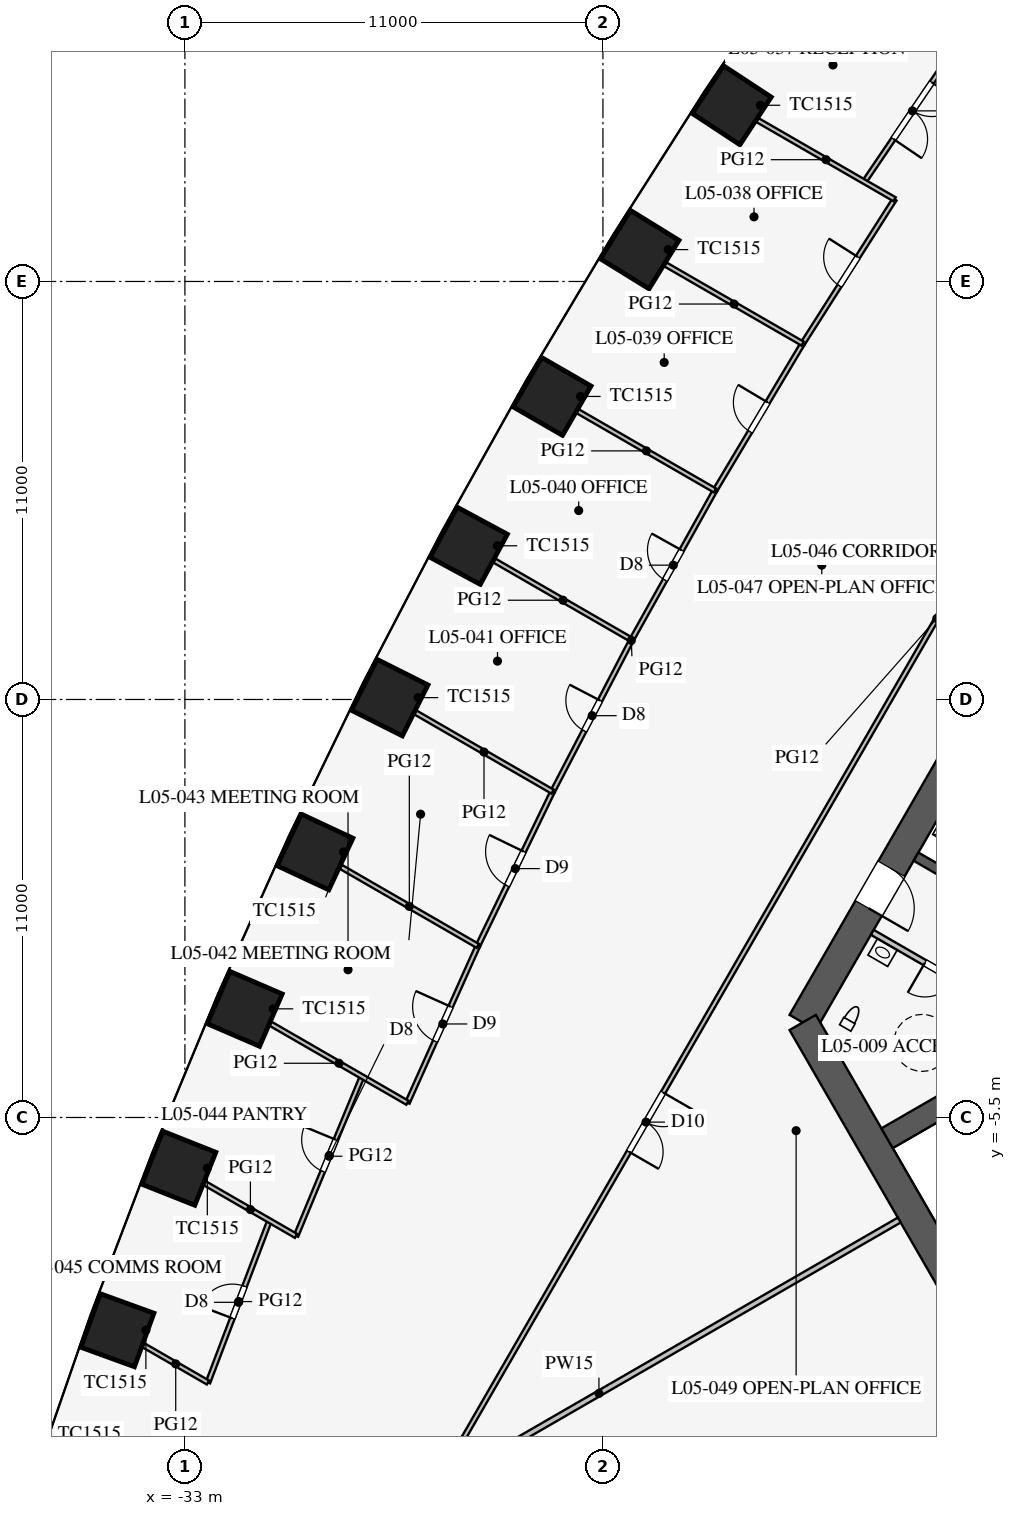
"""IFC4 building model, lengths in metres.
Left out: names, types, materials, properties, quantities, classifications, styles, units other than length and angle.
Written with IfcOpenShell. Run it as: python <this file> out.ifc"""

import sys

from ifc_helpers import new_model, si_unit, direction, frame, frame_2d, origin, origin_2d, place, context, subcontext, project, spatial, rectangle, extrude, element, fill, save


model = new_model("IFC4")
c1 = context("Model", 3, precision=1e-05, world=origin(), true_north=direction((0.0, 1.0)))
c2 = subcontext(c1, "Body", "Model", "MODEL_VIEW")
j1 = project(units=[si_unit("LENGTHUNIT", "METRE"), si_unit("PLANEANGLEUNIT", "RADIAN")], contexts=[c1])
p1 = place(None, origin())
s1 = spatial("IfcSite", under=j1, at=p1, CompositionType="ELEMENT")
p2 = place(p1, origin())
s2 = spatial("IfcBuilding", under=s1, at=p2, CompositionType="ELEMENT")
p3 = place(p2, frame((0.0, 0.0, 24.9)))
s3 = spatial("IfcBuildingStorey", under=s2, at=p3, CompositionType="ELEMENT", Elevation=24.9)
for number, where, z_axis, x_axis in (
    (1, (-18.611, 21.137, 0.0), (0.0, 0.0, 1.0), (-0.549, -0.836, 0.0)),
    (2, (-21.031, 17.339, 0.0), (0.0, 0.0, 1.0), (-0.525, -0.851, 0.0)),
    (3, (-23.338, 13.474, 0.0), (0.0, 0.0, 1.0), (-0.5, -0.866, 0.0)),
    (4, (-25.531, 9.544, 0.0), (0.0, 0.0, 1.0), (-0.475, -0.88, 0.0)),
    (5, (-27.611, 5.549, 0.0), (0.0, 0.0, 1.0), (-0.449, -0.894, 0.0)),
    (6, (-29.576, 1.487, 0.0), (0.0, 0.0, 1.0), (-0.423, -0.906, 0.0)),
    (7, (-31.426, -2.641, 0.0), (0.0, 0.0, 1.0), (-0.396, -0.918, 0.0)),
    (8, (-33.16, -6.836, 0.0), (0.0, 0.0, 1.0), (-0.369, -0.929, 0.0)),
    (9, (-34.776, -11.099, 0.0), (0.0, 0.0, 1.0), (-0.342, -0.94, 0.0)),
):
    element("IfcColumn", number, at=place(p3, frame(where, z_axis=z_axis, x_axis=x_axis)), inside=s3, PredefinedType="COLUMN", context=c2, shape_type="SweptSolid", body=[
        extrude(rectangle(XDim=1.5, YDim=1.5, at=origin_2d()), origin(), (0.0, 0.0, 1.0), 4.2),
    ])
p4 = place(p3, frame((-5.773, 16.0, 0.0), z_axis=(0.0, 0.0, 1.0), x_axis=(-0.500002442456, -0.866023993627, 0.0)))
e10 = element("IfcWall", 10, at=p4, inside=s3, PredefinedType="SHEAR", context=c2, shape_type="SweptSolid", body=[
    extrude(rectangle(XDim=21.939, YDim=0.8, at=frame_2d((10.97, 0.0))), origin(), (0.0, 0.0, 1.0), 4.2),
])
p5 = place(p4, frame((17.27, 0.0, 0.0)))
e11 = element("IfcOpeningElement", 11, at=p5, cuts=e10, PredefinedType="OPENING", context=c2, shape_type="SweptSolid", body=[
    extrude(rectangle(XDim=1.2, YDim=2.1, at=frame_2d((0.6, 1.05))), frame((0.0, 0.41, 0.0), z_axis=(0.0, -1.0, 0.0), x_axis=(1.0, 0.0, 0.0)), (0.0, 0.0, 1.0), 0.82),
])
p6 = place(p4, frame((3.47, 0.0, 0.0)))
e12 = element("IfcOpeningElement", 12, at=p6, cuts=e10, PredefinedType="OPENING", context=c2, shape_type="SweptSolid", body=[
    extrude(rectangle(XDim=1.2, YDim=2.1, at=frame_2d((0.6, 1.05))), frame((0.0, 0.41, 0.0), z_axis=(0.0, -1.0, 0.0), x_axis=(1.0, 0.0, 0.0)), (0.0, 0.0, 1.0), 0.82),
])
p7 = place(p3, frame((-16.743, -3.0, 0.0), z_axis=(0.0, 0.0, 1.0), x_axis=(0.499995765644, -0.866027848477, 0.0)))
e13 = element("IfcWall", 13, at=p7, inside=s3, PredefinedType="SHEAR", context=c2, shape_type="SweptSolid", body=[
    extrude(rectangle(XDim=11.547, YDim=0.8, at=frame_2d((5.773, 0.0))), origin(), (0.0, 0.0, 1.0), 4.2),
])
p8 = place(p3, frame((-11.532, 0.076, 0.0), z_axis=(0.0, 0.0, 1.0), x_axis=(-0.866005588531, 0.500034319456, 0.0)))
e14 = element("IfcWall", 14, at=p8, inside=s3, PredefinedType="SHEAR", context=c2, shape_type="SweptSolid", body=[
    extrude(rectangle(XDim=2.575, YDim=0.25, at=frame_2d((1.288, 0.0))), origin(), (0.0, 0.0, 1.0), 4.2),
])
p9 = place(p3, frame((-6.663, -1.509, 0.0), z_axis=(0.0, 0.0, 1.0), x_axis=(-0.866019375473, -0.500010441196, 0.0)))
e15 = element("IfcWall", 15, at=p9, inside=s3, PredefinedType="SHEAR", context=c2, shape_type="SweptSolid", body=[
    extrude(rectangle(XDim=9.075, YDim=0.6, at=frame_2d((4.538, 0.0))), origin(), (0.0, 0.0, 1.0), 4.2),
])
p10 = place(p3, frame((-10.495, -3.178, 0.0), z_axis=(0.0, 0.0, 1.0), x_axis=(-0.86602216432, 0.500005610874, 0.0)))
e16 = element("IfcWall", 16, at=p10, inside=s3, PredefinedType="PARTITIONING", context=c2, shape_type="SweptSolid", body=[
    extrude(rectangle(XDim=5.1, YDim=0.15, at=frame_2d((2.55, 0.0))), origin(), (0.0, 0.0, 1.0), 4.0),
])
p11 = place(p10, frame((2.6, 0.0, 0.0)))
e17 = element("IfcOpeningElement", 17, at=p11, cuts=e16, PredefinedType="OPENING", context=c2, shape_type="SweptSolid", body=[
    extrude(rectangle(XDim=0.9, YDim=2.1, at=frame_2d((0.45, 1.05))), frame((0.0, 0.085, 0.0), z_axis=(0.0, -1.0, 0.0), x_axis=(1.0, 0.0, 0.0)), (0.0, 0.0, 1.0), 0.17),
])
p12 = place(p3, frame((-14.203, -8.2, 0.0), z_axis=(0.0, 0.0, 1.0), x_axis=(-0.866024965723, -0.500000758745, 0.0)))
e18 = element("IfcWall", 18, at=p12, inside=s3, PredefinedType="PARTITIONING", context=c2, shape_type="SweptSolid", body=[
    extrude(rectangle(XDim=18.25, YDim=0.15, at=frame_2d((9.125, 0.0))), origin(), (0.0, 0.0, 1.0), 2.3),
])
p13 = place(p3, frame((-0.016, 30.491, 0.0), z_axis=(0.0, 0.0, 1.0), x_axis=(-0.50000091641, -0.866024874695, 0.0)))
e19 = element("IfcWall", 19, at=p13, inside=s3, PredefinedType="PARTITIONING", context=c2, shape_type="SweptSolid", body=[
    extrude(rectangle(XDim=52.796, YDim=0.12, at=frame_2d((26.398, 0.0))), origin(), (0.0, 0.0, 1.0), 2.9),
])
p14 = place(p13, frame((10.2, 0.0, 0.15)))
e20 = element("IfcOpeningElement", 20, at=p14, cuts=e19, PredefinedType="OPENING", context=c2, shape_type="SweptSolid", body=[
    extrude(rectangle(XDim=1.8, YDim=2.1, at=frame_2d((0.9, 1.05))), frame((0.0, 0.07, 0.0), z_axis=(0.0, -1.0, 0.0), x_axis=(1.0, 0.0, 0.0)), (0.0, 0.0, 1.0), 0.14),
])
p15 = place(p13, frame((40.8, 0.0, 0.15)))
e21 = element("IfcOpeningElement", 21, at=p15, cuts=e19, PredefinedType="OPENING", context=c2, shape_type="SweptSolid", body=[
    extrude(rectangle(XDim=1.8, YDim=2.1, at=frame_2d((0.9, 1.05))), frame((0.0, 0.07, 0.0), z_axis=(0.0, -1.0, 0.0), x_axis=(1.0, 0.0, 0.0)), (0.0, 0.0, 1.0), 0.14),
])
p16 = place(p3, frame((-19.052, 10.999, 0.0), z_axis=(0.0, 0.0, 1.0), x_axis=(-0.487373854787, -0.873193406795, 0.0)))
e22 = element("IfcWall", 22, at=p16, inside=s3, PredefinedType="PARTITIONING", context=c2, shape_type="SweptSolid", body=[
    extrude(rectangle(XDim=4.5, YDim=0.12, at=frame_2d((2.25, 0.0))), origin(), (0.0, 0.0, 1.0), 2.9),
])
p17 = place(p16, frame((1.8, 0.0, 0.15)))
e23 = element("IfcOpeningElement", 23, at=p17, cuts=e22, PredefinedType="OPENING", context=c2, shape_type="SweptSolid", body=[
    extrude(rectangle(XDim=0.9, YDim=2.1, at=frame_2d((0.45, 1.05))), frame((0.0, 0.07, 0.0), z_axis=(0.0, -1.0, 0.0), x_axis=(1.0, 0.0, 0.0)), (0.0, 0.0, 1.0), 0.14),
])
p18 = place(p3, frame((-25.292, -0.986, 0.0), z_axis=(0.0, 0.0, 1.0), x_axis=(-0.409451055745, -0.912332084796, 0.0)))
e24 = element("IfcWall", 24, at=p18, inside=s3, PredefinedType="PARTITIONING", context=c2, shape_type="SweptSolid", body=[
    extrude(rectangle(XDim=4.523, YDim=0.12, at=frame_2d((2.262, 0.0))), origin(), (0.0, 0.0, 1.0), 2.9),
])
p19 = place(p18, frame((1.75, 0.0, 0.15)))
e25 = element("IfcOpeningElement", 25, at=p19, cuts=e24, PredefinedType="OPENING", context=c2, shape_type="SweptSolid", body=[
    extrude(rectangle(XDim=1.0, YDim=2.1, at=frame_2d((0.5, 1.05))), frame((0.0, 0.07, 0.0), z_axis=(0.0, -1.0, 0.0), x_axis=(1.0, 0.0, 0.0)), (0.0, 0.0, 1.0), 0.14),
])
p20 = place(p3, frame((-28.339, -4.423, 0.0), z_axis=(0.0, 0.0, 1.0), x_axis=(-0.382639984525, -0.923897527999, 0.0)))
e26 = element("IfcWall", 26, at=p20, inside=s3, PredefinedType="PARTITIONING", context=c2, shape_type="SweptSolid", body=[
    extrude(rectangle(XDim=4.539, YDim=0.12, at=frame_2d((2.27, 0.0))), origin(), (0.0, 0.0, 1.0), 2.9),
])
p21 = place(p20, frame((1.8, 0.0, 0.15)))
e27 = element("IfcOpeningElement", 27, at=p21, cuts=e26, PredefinedType="OPENING", context=c2, shape_type="SweptSolid", body=[
    extrude(rectangle(XDim=0.9, YDim=2.1, at=frame_2d((0.45, 1.05))), frame((0.0, 0.07, 0.0), z_axis=(0.0, -1.0, 0.0), x_axis=(1.0, 0.0, 0.0)), (0.0, 0.0, 1.0), 0.14),
])
p22 = place(p3, frame((-30.773, -8.214, 0.0), z_axis=(0.0, 0.0, 1.0), x_axis=(-0.355351603025, -0.93473270951, 0.0)))
e28 = element("IfcWall", 28, at=p22, inside=s3, PredefinedType="PARTITIONING", context=c2, shape_type="SweptSolid", body=[
    extrude(rectangle(XDim=4.559, YDim=0.12, at=frame_2d((2.279, 0.0))), origin(), (0.0, 0.0, 1.0), 2.9),
])
p23 = place(p22, frame((1.85, 0.0, 0.15)))
e29 = element("IfcOpeningElement", 29, at=p23, cuts=e28, PredefinedType="OPENING", context=c2, shape_type="SweptSolid", body=[
    extrude(rectangle(XDim=0.9, YDim=2.1, at=frame_2d((0.45, 1.05))), frame((0.0, 0.07, 0.0), z_axis=(0.0, -1.0, 0.0), x_axis=(1.0, 0.0, 0.0)), (0.0, 0.0, 1.0), 0.14),
])
p24 = place(p3, frame((-21.245, 7.07, 0.0), z_axis=(0.0, 0.0, 1.0), x_axis=(-0.461852697957, -0.886956642339, 0.0)))
e30 = element("IfcWall", 30, at=p24, inside=s3, PredefinedType="PARTITIONING", context=c2, shape_type="SweptSolid", body=[
    extrude(rectangle(XDim=4.504, YDim=0.12, at=frame_2d((2.252, 0.0))), origin(), (0.0, 0.0, 1.0), 2.9),
])
p25 = place(p24, frame((1.8, 0.0, 0.15)))
e31 = element("IfcOpeningElement", 31, at=p25, cuts=e30, PredefinedType="OPENING", context=c2, shape_type="SweptSolid", body=[
    extrude(rectangle(XDim=0.9, YDim=2.1, at=frame_2d((0.45, 1.05))), frame((0.0, 0.07, 0.0), z_axis=(0.0, -1.0, 0.0), x_axis=(1.0, 0.0, 0.0)), (0.0, 0.0, 1.0), 0.14),
])
p26 = place(p3, frame((-23.325, 3.074, 0.0), z_axis=(0.0, 0.0, 1.0), x_axis=(-0.435857917556, -0.900015486369, 0.0)))
e32 = element("IfcWall", 32, at=p26, inside=s3, PredefinedType="PARTITIONING", context=c2, shape_type="SweptSolid", body=[
    extrude(rectangle(XDim=4.512, YDim=0.12, at=frame_2d((2.256, 0.0))), origin(), (0.0, 0.0, 1.0), 2.9),
])
p27 = place(p26, frame((1.75, 0.0, 0.15)))
e33 = element("IfcOpeningElement", 33, at=p27, cuts=e32, PredefinedType="OPENING", context=c2, shape_type="SweptSolid", body=[
    extrude(rectangle(XDim=1.0, YDim=2.1, at=frame_2d((0.5, 1.05))), frame((0.0, 0.07, 0.0), z_axis=(0.0, -1.0, 0.0), x_axis=(1.0, 0.0, 0.0)), (0.0, 0.0, 1.0), 0.14),
])
p28 = place(p3, frame((-12.588, 22.856, 0.0), z_axis=(0.0, 0.0, 1.0), x_axis=(-0.561486863223, -0.827485650889, 0.0)))
e34 = element("IfcWall", 34, at=p28, inside=s3, PredefinedType="PARTITIONING", context=c2, shape_type="SweptSolid", body=[
    extrude(rectangle(XDim=4.512, YDim=0.12, at=frame_2d((2.256, 0.0))), origin(), (0.0, 0.0, 1.0), 2.9),
])
p29 = place(p28, frame((1.35, 0.0, 0.15)))
e35 = element("IfcOpeningElement", 35, at=p29, cuts=e34, PredefinedType="OPENING", context=c2, shape_type="SweptSolid", body=[
    extrude(rectangle(XDim=1.8, YDim=2.1, at=frame_2d((0.9, 1.05))), frame((0.0, 0.07, 0.0), z_axis=(0.0, -1.0, 0.0), x_axis=(1.0, 0.0, 0.0)), (0.0, 0.0, 1.0), 0.14),
])
p30 = place(p3, frame((-16.745, 14.864, 0.0), z_axis=(0.0, 0.0, 1.0), x_axis=(-0.51252396108, -0.858672923364, 0.0)))
e36 = element("IfcWall", 36, at=p30, inside=s3, PredefinedType="PARTITIONING", context=c2, shape_type="SweptSolid", body=[
    extrude(rectangle(XDim=4.5, YDim=0.12, at=frame_2d((2.25, 0.0))), origin(), (0.0, 0.0, 1.0), 2.9),
])
p31 = place(p30, frame((1.8, 0.0, 0.15)))
e37 = element("IfcOpeningElement", 37, at=p31, cuts=e36, PredefinedType="OPENING", context=c2, shape_type="SweptSolid", body=[
    extrude(rectangle(XDim=0.9, YDim=2.1, at=frame_2d((0.45, 1.05))), frame((0.0, 0.07, 0.0), z_axis=(0.0, -1.0, 0.0), x_axis=(1.0, 0.0, 0.0)), (0.0, 0.0, 1.0), 0.14),
])
p32 = place(p3, frame((-14.325, 18.663, 0.0), z_axis=(0.0, 0.0, 1.0), x_axis=(-0.537205132487, -0.843451626135, 0.0)))
e38 = element("IfcWall", 38, at=p32, inside=s3, PredefinedType="PARTITIONING", context=c2, shape_type="SweptSolid", body=[
    extrude(rectangle(XDim=4.504, YDim=0.12, at=frame_2d((2.252, 0.0))), origin(), (0.0, 0.0, 1.0), 2.9),
])
p33 = place(p32, frame((1.8, 0.0, 0.15)))
e39 = element("IfcOpeningElement", 39, at=p33, cuts=e38, PredefinedType="OPENING", context=c2, shape_type="SweptSolid", body=[
    extrude(rectangle(XDim=0.9, YDim=2.1, at=frame_2d((0.45, 1.05))), frame((0.0, 0.07, 0.0), z_axis=(0.0, -1.0, 0.0), x_axis=(1.0, 0.0, 0.0)), (0.0, 0.0, 1.0), 0.14),
])
p34 = place(p3, frame((-19.052, 10.999, 0.0), z_axis=(0.0, 0.0, 1.0), x_axis=(-0.866004239599, 0.500036655653, 0.0)))
e40 = element("IfcWall", 40, at=p34, inside=s3, PredefinedType="PARTITIONING", context=c2, shape_type="SweptSolid", body=[
    extrude(rectangle(XDim=4.17, YDim=0.12, at=frame_2d((2.085, 0.0))), origin(), (0.0, 0.0, 1.0), 2.9),
])
p35 = place(p3, frame((-25.292, -0.986, 0.0), z_axis=(0.0, 0.0, 1.0), x_axis=(-0.866011781705, 0.500023593391, 0.0)))
e41 = element("IfcWall", 41, at=p35, inside=s3, PredefinedType="PARTITIONING", context=c2, shape_type="SweptSolid", body=[
    extrude(rectangle(XDim=4.164, YDim=0.12, at=frame_2d((2.082, 0.0))), origin(), (0.0, 0.0, 1.0), 2.9),
])
p36 = place(p3, frame((-27.144, -5.113, 0.0), z_axis=(0.0, 0.0, 1.0), x_axis=(-0.866031144707, 0.499990056298, 0.0)))
e42 = element("IfcWall", 42, at=p36, inside=s3, PredefinedType="PARTITIONING", context=c2, shape_type="SweptSolid", body=[
    extrude(rectangle(XDim=4.159, YDim=0.12, at=frame_2d((2.08, 0.0))), origin(), (0.0, 0.0, 1.0), 2.9),
])
p37 = place(p3, frame((-30.076, -8.617, 0.0), z_axis=(0.0, 0.0, 1.0), x_axis=(-0.866002324719, 0.500039971984, 0.0)))
e43 = element("IfcWall", 43, at=p37, inside=s3, PredefinedType="PARTITIONING", context=c2, shape_type="SweptSolid", body=[
    extrude(rectangle(XDim=2.773, YDim=0.12, at=frame_2d((1.387, 0.0))), origin(), (0.0, 0.0, 1.0), 2.9),
])
p38 = place(p3, frame((-32.393, -12.475, 0.0), z_axis=(0.0, 0.0, 1.0), x_axis=(-0.865996887259, 0.500049388818, 0.0)))
e44 = element("IfcWall", 44, at=p38, inside=s3, PredefinedType="PARTITIONING", context=c2, shape_type="SweptSolid", body=[
    extrude(rectangle(XDim=1.961, YDim=0.12, at=frame_2d((0.98, 0.0))), origin(), (0.0, 0.0, 1.0), 2.9),
])
p39 = place(p3, frame((-21.245, 7.07, 0.0), z_axis=(0.0, 0.0, 1.0), x_axis=(-0.866025669538, 0.499999539701, 0.0)))
e45 = element("IfcWall", 45, at=p39, inside=s3, PredefinedType="PARTITIONING", context=c2, shape_type="SweptSolid", body=[
    extrude(rectangle(XDim=4.169, YDim=0.12, at=frame_2d((2.085, 0.0))), origin(), (0.0, 0.0, 1.0), 2.9),
])
p40 = place(p3, frame((-23.325, 3.074, 0.0), z_axis=(0.0, 0.0, 1.0), x_axis=(-0.866009971343, 0.50002672882, 0.0)))
e46 = element("IfcWall", 46, at=p40, inside=s3, PredefinedType="PARTITIONING", context=c2, shape_type="SweptSolid", body=[
    extrude(rectangle(XDim=4.167, YDim=0.12, at=frame_2d((2.083, 0.0))), origin(), (0.0, 0.0, 1.0), 2.9),
])
p41 = place(p3, frame((-16.745, 14.864, 0.0), z_axis=(0.0, 0.0, 1.0), x_axis=(-0.866025669538, 0.499999539701, 0.0)))
e47 = element("IfcWall", 47, at=p41, inside=s3, PredefinedType="PARTITIONING", context=c2, shape_type="SweptSolid", body=[
    extrude(rectangle(XDim=4.169, YDim=0.12, at=frame_2d((2.085, 0.0))), origin(), (0.0, 0.0, 1.0), 2.9),
])
p42 = place(p3, frame((-14.325, 18.663, 0.0), z_axis=(0.0, 0.0, 1.0), x_axis=(-0.866009971343, 0.50002672882, 0.0)))
e48 = element("IfcWall", 48, at=p42, inside=s3, PredefinedType="PARTITIONING", context=c2, shape_type="SweptSolid", body=[
    extrude(rectangle(XDim=4.167, YDim=0.12, at=frame_2d((2.083, 0.0))), origin(), (0.0, 0.0, 1.0), 2.9),
])
p43 = place(p11, origin())
e49 = element("IfcDoor", 49, at=p43, inside=s3, OperationType="SINGLE_SWING_RIGHT", PredefinedType="DOOR", context=c2, shape_type="SweptSolid", body=[
    extrude(rectangle(XDim=0.9, YDim=2.1, at=frame_2d((0.45, 1.05))), frame((0.0, 0.025, 0.0), z_axis=(0.0, -1.0, 0.0), x_axis=(1.0, 0.0, 0.0)), (0.0, 0.0, 1.0), 0.05),
])
fill(e17, e49)
p44 = place(p5, origin())
e50 = element("IfcDoor", 50, at=p44, inside=s3, OperationType="SINGLE_SWING_RIGHT", PredefinedType="DOOR", context=c2, shape_type="SweptSolid", body=[
    extrude(rectangle(XDim=1.2, YDim=2.1, at=frame_2d((0.6, 1.05))), frame((0.0, 0.025, 0.0), z_axis=(0.0, -1.0, 0.0), x_axis=(1.0, 0.0, 0.0)), (0.0, 0.0, 1.0), 0.05),
])
fill(e11, e50)
p45 = place(p29, origin())
e51 = element("IfcDoor", 51, at=p45, inside=s3, OperationType="DOUBLE_DOOR_SINGLE_SWING", PredefinedType="DOOR", context=c2, shape_type="SweptSolid", body=[
    extrude(rectangle(XDim=1.8, YDim=2.1, at=frame_2d((0.9, 1.05))), frame((0.0, 0.025, 0.0), z_axis=(0.0, -1.0, 0.0), x_axis=(1.0, 0.0, 0.0)), (0.0, 0.0, 1.0), 0.05),
])
fill(e35, e51)
p46 = place(p33, frame((0.9, 0.0, 0.0), z_axis=(0.0, 0.0, 1.0), x_axis=(-1.0, 0.0, 0.0)))
e52 = element("IfcDoor", 52, at=p46, inside=s3, OperationType="SINGLE_SWING_RIGHT", PredefinedType="DOOR", context=c2, shape_type="SweptSolid", body=[
    extrude(rectangle(XDim=0.9, YDim=2.1, at=frame_2d((0.45, 1.05))), frame((0.0, 0.025, 0.0), z_axis=(0.0, -1.0, 0.0), x_axis=(1.0, 0.0, 0.0)), (0.0, 0.0, 1.0), 0.05),
])
fill(e39, e52)
p47 = place(p31, frame((0.9, 0.0, 0.0), z_axis=(0.0, 0.0, 1.0), x_axis=(-1.0, 0.0, 0.0)))
e53 = element("IfcDoor", 53, at=p47, inside=s3, OperationType="SINGLE_SWING_RIGHT", PredefinedType="DOOR", context=c2, shape_type="SweptSolid", body=[
    extrude(rectangle(XDim=0.9, YDim=2.1, at=frame_2d((0.45, 1.05))), frame((0.0, 0.025, 0.0), z_axis=(0.0, -1.0, 0.0), x_axis=(1.0, 0.0, 0.0)), (0.0, 0.0, 1.0), 0.05),
])
fill(e37, e53)
p48 = place(p17, frame((0.9, 0.0, 0.0), z_axis=(0.0, 0.0, 1.0), x_axis=(-1.0, 0.0, 0.0)))
e54 = element("IfcDoor", 54, at=p48, inside=s3, OperationType="SINGLE_SWING_RIGHT", PredefinedType="DOOR", context=c2, shape_type="SweptSolid", body=[
    extrude(rectangle(XDim=0.9, YDim=2.1, at=frame_2d((0.45, 1.05))), frame((0.0, 0.025, 0.0), z_axis=(0.0, -1.0, 0.0), x_axis=(1.0, 0.0, 0.0)), (0.0, 0.0, 1.0), 0.05),
])
fill(e23, e54)
p49 = place(p25, frame((0.9, 0.0, 0.0), z_axis=(0.0, 0.0, 1.0), x_axis=(-1.0, 0.0, 0.0)))
e55 = element("IfcDoor", 55, at=p49, inside=s3, OperationType="SINGLE_SWING_RIGHT", PredefinedType="DOOR", context=c2, shape_type="SweptSolid", body=[
    extrude(rectangle(XDim=0.9, YDim=2.1, at=frame_2d((0.45, 1.05))), frame((0.0, 0.025, 0.0), z_axis=(0.0, -1.0, 0.0), x_axis=(1.0, 0.0, 0.0)), (0.0, 0.0, 1.0), 0.05),
])
fill(e31, e55)
p50 = place(p27, frame((1.0, 0.0, 0.0), z_axis=(0.0, 0.0, 1.0), x_axis=(-1.0, 0.0, 0.0)))
e56 = element("IfcDoor", 56, at=p50, inside=s3, OperationType="SINGLE_SWING_RIGHT", PredefinedType="DOOR", context=c2, shape_type="SweptSolid", body=[
    extrude(rectangle(XDim=1.0, YDim=2.1, at=frame_2d((0.5, 1.05))), frame((0.0, 0.025, 0.0), z_axis=(0.0, -1.0, 0.0), x_axis=(1.0, 0.0, 0.0)), (0.0, 0.0, 1.0), 0.05),
])
fill(e33, e56)
p51 = place(p19, frame((1.0, 0.0, 0.0), z_axis=(0.0, 0.0, 1.0), x_axis=(-1.0, 0.0, 0.0)))
e57 = element("IfcDoor", 57, at=p51, inside=s3, OperationType="SINGLE_SWING_RIGHT", PredefinedType="DOOR", context=c2, shape_type="SweptSolid", body=[
    extrude(rectangle(XDim=1.0, YDim=2.1, at=frame_2d((0.5, 1.05))), frame((0.0, 0.025, 0.0), z_axis=(0.0, -1.0, 0.0), x_axis=(1.0, 0.0, 0.0)), (0.0, 0.0, 1.0), 0.05),
])
fill(e25, e57)
p52 = place(p21, frame((0.9, 0.0, 0.0), z_axis=(0.0, 0.0, 1.0), x_axis=(-1.0, 0.0, 0.0)))
e58 = element("IfcDoor", 58, at=p52, inside=s3, OperationType="SINGLE_SWING_RIGHT", PredefinedType="DOOR", context=c2, shape_type="SweptSolid", body=[
    extrude(rectangle(XDim=0.9, YDim=2.1, at=frame_2d((0.45, 1.05))), frame((0.0, 0.025, 0.0), z_axis=(0.0, -1.0, 0.0), x_axis=(1.0, 0.0, 0.0)), (0.0, 0.0, 1.0), 0.05),
])
fill(e27, e58)
p53 = place(p23, frame((0.9, 0.0, 0.0), z_axis=(0.0, 0.0, 1.0), x_axis=(-1.0, 0.0, 0.0)))
e59 = element("IfcDoor", 59, at=p53, inside=s3, OperationType="SINGLE_SWING_LEFT", PredefinedType="DOOR", context=c2, shape_type="SweptSolid", body=[
    extrude(rectangle(XDim=0.9, YDim=2.1, at=frame_2d((0.45, 1.05))), frame((0.0, 0.025, 0.0), z_axis=(0.0, -1.0, 0.0), x_axis=(1.0, 0.0, 0.0)), (0.0, 0.0, 1.0), 0.05),
])
fill(e29, e59)
p54 = place(p15, origin())
e60 = element("IfcDoor", 60, at=p54, inside=s3, OperationType="DOUBLE_DOOR_SINGLE_SWING", PredefinedType="DOOR", context=c2, shape_type="SweptSolid", body=[
    extrude(rectangle(XDim=1.8, YDim=2.1, at=frame_2d((0.9, 1.05))), frame((0.0, 0.025, 0.0), z_axis=(0.0, -1.0, 0.0), x_axis=(1.0, 0.0, 0.0)), (0.0, 0.0, 1.0), 0.05),
])
fill(e21, e60)
save(model, sys.argv[1])
